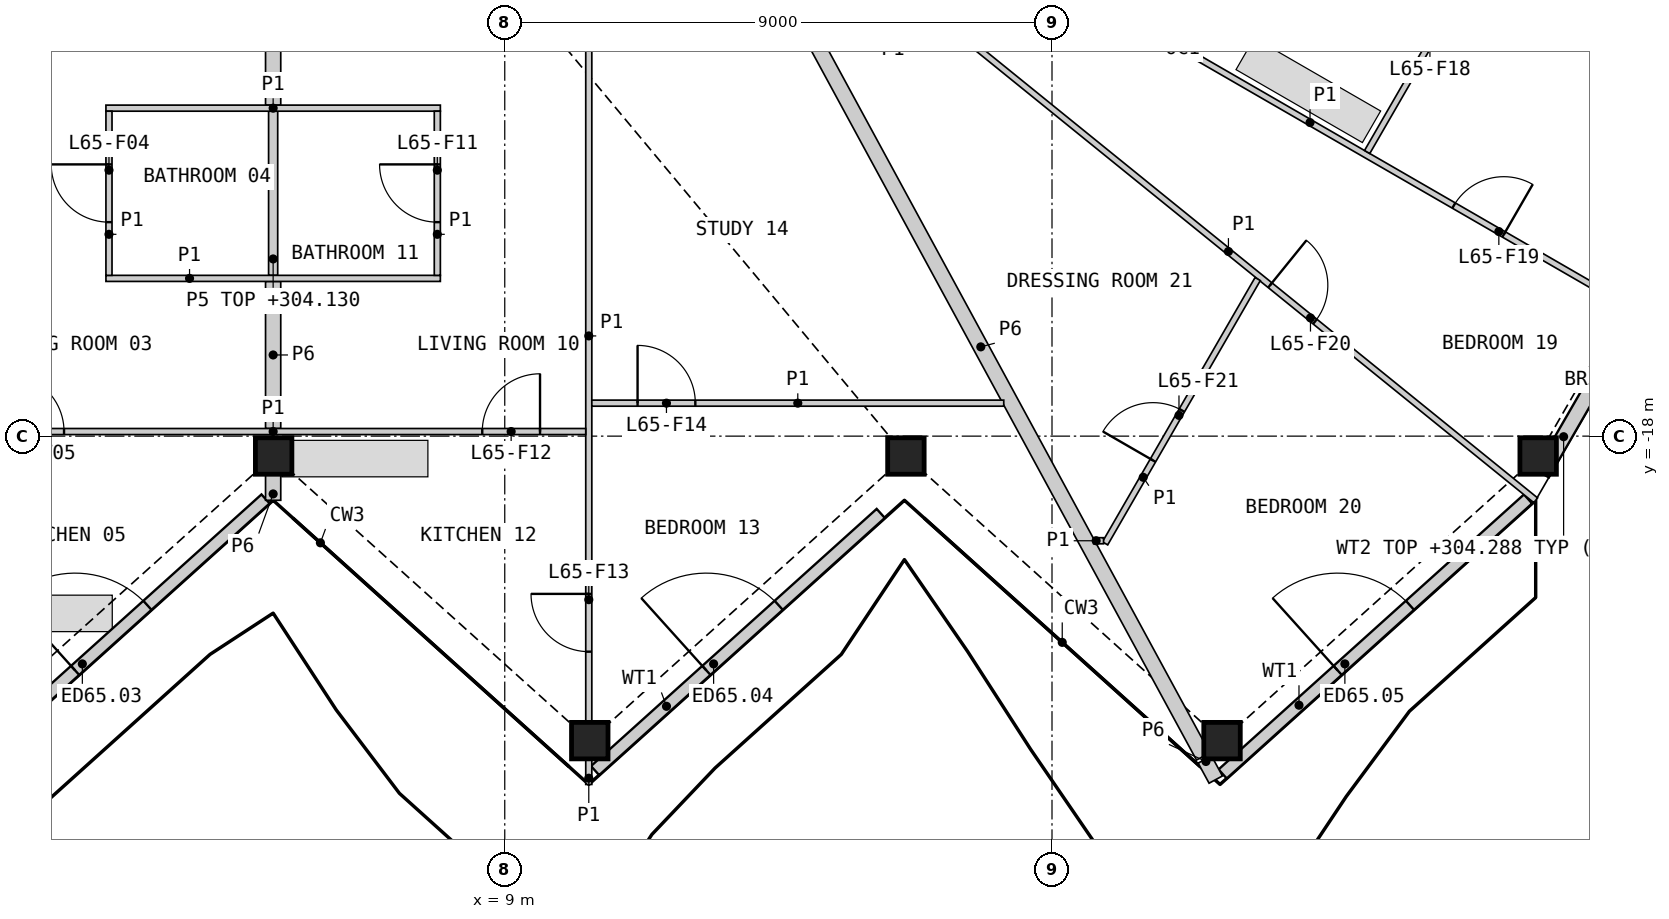
"""IFC4 building model, lengths in metres.
Left out: names, types, materials, properties, quantities, classifications, styles, units other than length and angle.
Written with IfcOpenShell. Run it as: python <this file> out.ifc"""

import sys

from ifc_helpers import new_model, si_unit, direction, frame, frame_2d, origin, origin_2d, place, context, subcontext, project, spatial, rectangle, hollow_rectangle, extrude, element, fill, save


model = new_model("IFC4")
c1 = context("Model", 3, precision=1e-05, world=origin(), true_north=direction((0.0, 1.0)))
c2 = subcontext(c1, "Body", "Model", "MODEL_VIEW")
j1 = project(units=[si_unit("LENGTHUNIT", "METRE"), si_unit("PLANEANGLEUNIT", "RADIAN")], contexts=[c1])
p1 = place(None, origin())
s1 = spatial("IfcSite", under=j1, at=p1, CompositionType="ELEMENT")
p2 = place(p1, origin())
s2 = spatial("IfcBuilding", under=s1, at=p2, CompositionType="ELEMENT")
p3 = place(p2, frame((0.0, 0.0, 301.8)))
s3 = spatial("IfcBuildingStorey", under=s2, at=p3, CompositionType="ELEMENT", Elevation=301.8)
for number, where, z_axis, x_axis in (
    (1, (5.199, -18.327, 0.0), (0.0, 0.0, 1.0), (1.0, 0.0, 0.0)),
    (2, (10.398, -23.008, 0.0), (0.0, 0.0, 1.0), (1.0, 0.0, 0.0)),
    (3, (15.597, -18.327, 0.0), (0.0, 0.0, 1.0), (1.0, 0.0, 0.0)),
    (4, (20.796, -23.008, 0.0), (0.0, 0.0, 1.0), (1.0, 0.0, 0.0)),
    (5, (25.995, -18.327, 0.0), (0.0, 0.0, 1.0), (1.0, 0.0, 0.0)),
):
    element("IfcColumn", number, at=place(p3, frame(where, z_axis=z_axis, x_axis=x_axis)), inside=s3, PredefinedType="COLUMN", context=c2, shape_type="SweptSolid", body=[
        extrude(hollow_rectangle(XDim=0.6, YDim=0.6, WallThickness=0.04, at=origin_2d()), origin(), (0.0, 0.0, 1.0), 3.4),
    ])
p4 = place(p3, frame((0.104, -23.501, 0.0), z_axis=(0.0, 0.0, 1.0), x_axis=(0.743137782456, 0.669138428344, 0.0)))
e6 = element("IfcWall", 6, at=p4, inside=s3, PredefinedType="SOLIDWALL", context=c2, shape_type="SweptSolid", body=[
    extrude(rectangle(XDim=6.678, YDim=0.2, at=frame_2d((3.339, 0.0))), origin(), (0.0, 0.0, 1.0), 2.488),
])
p5 = place(p4, frame((2.463, 0.0, 0.0)))
e7 = element("IfcOpeningElement", 7, at=p5, cuts=e6, PredefinedType="OPENING", context=c2, shape_type="SweptSolid", body=[
    extrude(rectangle(XDim=1.6, YDim=2.25, at=frame_2d((0.8, 1.125))), frame((0.0, 0.11, 0.0), z_axis=(0.0, -1.0, 0.0), x_axis=(1.0, 0.0, 0.0)), (0.0, 0.0, 1.0), 0.22),
])
p6 = place(p3, frame((10.485, -23.501, 0.0), z_axis=(0.0, 0.0, 1.0), x_axis=(0.743134744054, 0.669141802745, 0.0)))
e8 = element("IfcWall", 8, at=p6, inside=s3, PredefinedType="SOLIDWALL", context=c2, shape_type="SweptSolid", body=[
    extrude(rectangle(XDim=6.322, YDim=0.2, at=frame_2d((3.161, 0.0))), origin(), (0.0, 0.0, 1.0), 2.488),
])
p7 = place(p6, frame((2.463, 0.0, 0.0)))
e9 = element("IfcOpeningElement", 9, at=p7, cuts=e8, PredefinedType="OPENING", context=c2, shape_type="SweptSolid", body=[
    extrude(rectangle(XDim=1.6, YDim=2.25, at=frame_2d((0.8, 1.125))), frame((0.0, 0.11, 0.0), z_axis=(0.0, -1.0, 0.0), x_axis=(1.0, 0.0, 0.0)), (0.0, 0.0, 1.0), 0.22),
])
p8 = place(p3, frame((20.806, -23.556, 0.0), z_axis=(0.0, 0.0, 1.0), x_axis=(0.743145048269, 0.669130358924, 0.0)))
e10 = element("IfcWall", 10, at=p8, inside=s3, PredefinedType="SOLIDWALL", context=c2, shape_type="SweptSolid", body=[
    extrude(rectangle(XDim=6.759, YDim=0.2, at=frame_2d((3.379, 0.0))), origin(), (0.0, 0.0, 1.0), 2.488),
])
p9 = place(p8, frame((2.545, 0.0, 0.0)))
e11 = element("IfcOpeningElement", 11, at=p9, cuts=e10, PredefinedType="OPENING", context=c2, shape_type="SweptSolid", body=[
    extrude(rectangle(XDim=1.6, YDim=2.25, at=frame_2d((0.8, 1.125))), frame((0.0, 0.11, 0.0), z_axis=(0.0, -1.0, 0.0), x_axis=(1.0, 0.0, 0.0)), (0.0, 0.0, 1.0), 0.22),
])
p10 = place(p3, frame((26.063, -18.617, 0.0), z_axis=(0.0, 0.0, 1.0), x_axis=(0.499968627931, 0.866043515699, 0.0)))
e12 = element("IfcWall", 12, at=p10, inside=s3, PredefinedType="SOLIDWALL", context=c2, shape_type="SweptSolid", body=[
    extrude(rectangle(XDim=2.804, YDim=0.25, at=frame_2d((1.402, 0.0))), origin(), (0.0, 0.0, 1.0), 2.488),
])
p11 = place(p10, frame((1.55, 0.0, 1.6)))
e13 = element("IfcOpeningElement", 13, at=p11, cuts=e12, PredefinedType="OPENING", context=c2, shape_type="SweptSolid", body=[
    extrude(rectangle(XDim=0.9, YDim=0.6, at=frame_2d((0.45, 0.3))), frame((0.0, 0.135, 0.0), z_axis=(0.0, -1.0, 0.0), x_axis=(1.0, 0.0, 0.0)), (0.0, 0.0, 1.0), 0.27),
])
p12 = place(p3, frame((13.171, -9.796, 0.0), z_axis=(0.0, 0.0, 1.0), x_axis=(0.477178668135, -0.878806303275, 0.0)))
e14 = element("IfcWall", 14, at=p12, inside=s3, PredefinedType="PARTITIONING", context=c2, shape_type="SweptSolid", body=[
    extrude(rectangle(XDim=15.33, YDim=0.25, at=frame_2d((7.665, 0.0))), origin(), (0.0, 0.0, 1.0), 2.33),
])
p13 = place(p3, frame((5.191, -12.556, 0.0), z_axis=(0.0, 0.0, 1.0), x_axis=(0.0, 1.0, 0.0)))
e15 = element("IfcWall", 15, at=p13, inside=s3, PredefinedType="PARTITIONING", context=c2, shape_type="SweptSolid", body=[
    extrude(rectangle(XDim=2.55, YDim=0.25, at=frame_2d((1.275, 0.0))), origin(), (0.0, 0.0, 1.0), 2.33),
])
p14 = place(p3, frame((5.191, -17.875, 0.0), z_axis=(0.0, 0.0, 1.0), x_axis=(0.0, 1.0, 0.0)))
e16 = element("IfcWall", 16, at=p14, inside=s3, PredefinedType="PARTITIONING", context=c2, shape_type="SweptSolid", body=[
    extrude(rectangle(XDim=2.419, YDim=0.25, at=frame_2d((1.209, 0.0))), origin(), (0.0, 0.0, 1.0), 2.33),
])
p15 = place(p3, frame((5.191, -19.055, 0.0), z_axis=(0.0, 0.0, 1.0), x_axis=(0.0, 1.0, 0.0)))
e17 = element("IfcWall", 17, at=p15, inside=s3, PredefinedType="PARTITIONING", context=c2, shape_type="SweptSolid", body=[
    extrude(rectangle(XDim=0.418, YDim=0.25, at=frame_2d((0.209, 0.0))), origin(), (0.0, 0.0, 1.0), 2.33),
])
p16 = place(p3, frame((20.514, -23.318, 0.0), z_axis=(0.0, 0.0, 1.0), x_axis=(0.477077538769, -0.878861207474, 0.0)))
e18 = element("IfcWall", 18, at=p16, inside=s3, PredefinedType="PARTITIONING", context=c2, shape_type="SweptSolid", body=[
    extrude(rectangle(XDim=0.376, YDim=0.25, at=frame_2d((0.188, 0.0))), origin(), (0.0, 0.0, 1.0), 2.33),
])
p17 = place(p3, frame((5.191, -15.356, 0.0), z_axis=(0.0, 0.0, 1.0), x_axis=(0.0, 1.0, 0.0)))
e19 = element("IfcWall", 19, at=p17, inside=s3, PredefinedType="PLUMBINGWALL", context=c2, shape_type="SweptSolid", body=[
    extrude(rectangle(XDim=2.7, YDim=0.15, at=frame_2d((1.35, 0.0))), origin(), (0.0, 0.0, 1.0), 2.33),
])
p18 = place(p3, frame((15.848, -10.871, 0.0), z_axis=(0.0, 0.0, 1.0), x_axis=(0.77713687197, -0.629331615465, 0.0)))
e20 = element("IfcWall", 20, at=p18, inside=s3, PredefinedType="PARTITIONING", context=c2, shape_type="SweptSolid", body=[
    extrude(rectangle(XDim=13.004, YDim=0.1, at=frame_2d((6.502, 0.0))), origin(), (0.0, 0.0, 1.0), 2.33),
])
p19 = place(p18, frame((7.384, 0.0, 0.0)))
e21 = element("IfcOpeningElement", 21, at=p19, cuts=e20, PredefinedType="OPENING", context=c2, shape_type="SweptSolid", body=[
    extrude(rectangle(XDim=0.95, YDim=2.1, at=frame_2d((0.475, 1.05))), frame((0.0, 0.06, 0.0), z_axis=(0.0, -1.0, 0.0), x_axis=(1.0, 0.0, 0.0)), (0.0, 0.0, 1.0), 0.12),
])
p20 = place(p3, frame((10.382, -22.698, 0.0), z_axis=(0.0, 0.0, 1.0), x_axis=(0.0, 1.0, 0.0)))
e22 = element("IfcWall", 22, at=p20, inside=s3, PredefinedType="PARTITIONING", context=c2, shape_type="SweptSolid", body=[
    extrude(rectangle(XDim=12.692, YDim=0.1, at=frame_2d((6.346, 0.0))), origin(), (0.0, 0.0, 1.0), 2.33),
])
p21 = place(p20, frame((1.153, 0.0, 0.0)))
e23 = element("IfcOpeningElement", 23, at=p21, cuts=e22, PredefinedType="OPENING", context=c2, shape_type="SweptSolid", body=[
    extrude(rectangle(XDim=0.95, YDim=2.1, at=frame_2d((0.475, 1.05))), frame((0.0, 0.06, 0.0), z_axis=(0.0, -1.0, 0.0), x_axis=(1.0, 0.0, 0.0)), (0.0, 0.0, 1.0), 0.12),
])
p22 = place(p3, frame((17.365, -10.025, 0.0), z_axis=(0.0, 0.0, 1.0), x_axis=(0.866021046153, -0.500007547564, 0.0)))
e24 = element("IfcWall", 24, at=p22, inside=s3, PredefinedType="PARTITIONING", context=c2, shape_type="SweptSolid", body=[
    extrude(rectangle(XDim=11.267, YDim=0.1, at=frame_2d((5.634, 0.0))), origin(), (0.0, 0.0, 1.0), 2.33),
])
p23 = place(p22, frame((8.364, 0.0, 0.0)))
e25 = element("IfcOpeningElement", 25, at=p23, cuts=e24, PredefinedType="OPENING", context=c2, shape_type="SweptSolid", body=[
    extrude(rectangle(XDim=0.95, YDim=2.1, at=frame_2d((0.475, 1.05))), frame((0.0, 0.06, 0.0), z_axis=(0.0, -1.0, 0.0), x_axis=(1.0, 0.0, 0.0)), (0.0, 0.0, 1.0), 0.12),
])
p24 = place(p3, frame((0.05, -17.924, 0.0), z_axis=(0.0, 0.0, 1.0), x_axis=(1.0, 0.0, 0.0)))
e26 = element("IfcWall", 26, at=p24, inside=s3, PredefinedType="PARTITIONING", context=c2, shape_type="SweptSolid", body=[
    extrude(rectangle(XDim=10.282, YDim=0.1, at=frame_2d((5.141, 0.0))), origin(), (0.0, 0.0, 1.0), 2.33),
])
p25 = place(p24, frame((0.752, 0.0, 0.0)))
e27 = element("IfcOpeningElement", 27, at=p25, cuts=e26, PredefinedType="OPENING", context=c2, shape_type="SweptSolid", body=[
    extrude(rectangle(XDim=0.95, YDim=2.1, at=frame_2d((0.475, 1.05))), frame((0.0, 0.06, 0.0), z_axis=(0.0, -1.0, 0.0), x_axis=(1.0, 0.0, 0.0)), (0.0, 0.0, 1.0), 0.12),
])
p26 = place(p24, frame((8.58, 0.0, 0.0)))
e28 = element("IfcOpeningElement", 28, at=p26, cuts=e26, PredefinedType="OPENING", context=c2, shape_type="SweptSolid", body=[
    extrude(rectangle(XDim=0.95, YDim=2.1, at=frame_2d((0.475, 1.05))), frame((0.0, 0.06, 0.0), z_axis=(0.0, -1.0, 0.0), x_axis=(1.0, 0.0, 0.0)), (0.0, 0.0, 1.0), 0.12),
])
p27 = place(p3, frame((23.183, -13.327, 0.0), z_axis=(0.0, 0.0, 1.0), x_axis=(0.499991741039, 0.866030172045, 0.0)))
e29 = element("IfcWall", 29, at=p27, inside=s3, PredefinedType="PARTITIONING", context=c2, shape_type="SweptSolid", body=[
    extrude(rectangle(XDim=7.927, YDim=0.1, at=frame_2d((3.963, 0.0))), origin(), (0.0, 0.0, 1.0), 2.33),
])
p28 = place(p27, frame((1.97, 0.0, 0.0)))
e30 = element("IfcOpeningElement", 30, at=p28, cuts=e29, PredefinedType="OPENING", context=c2, shape_type="SweptSolid", body=[
    extrude(rectangle(XDim=0.95, YDim=2.1, at=frame_2d((0.475, 1.05))), frame((0.0, 0.06, 0.0), z_axis=(0.0, -1.0, 0.0), x_axis=(1.0, 0.0, 0.0)), (0.0, 0.0, 1.0), 0.12),
])
p29 = place(p3, frame((10.432, -17.458, 0.0), z_axis=(0.0, 0.0, 1.0), x_axis=(1.0, 0.0, 0.0)))
e31 = element("IfcWall", 31, at=p29, inside=s3, PredefinedType="PARTITIONING", context=c2, shape_type="SweptSolid", body=[
    extrude(rectangle(XDim=6.775, YDim=0.1, at=frame_2d((3.387, 0.0))), origin(), (0.0, 0.0, 1.0), 2.33),
])
p30 = place(p29, frame((0.752, 0.0, 0.0)))
e32 = element("IfcOpeningElement", 32, at=p30, cuts=e31, PredefinedType="OPENING", context=c2, shape_type="SweptSolid", body=[
    extrude(rectangle(XDim=0.95, YDim=2.1, at=frame_2d((0.475, 1.05))), frame((0.0, 0.06, 0.0), z_axis=(0.0, -1.0, 0.0), x_axis=(1.0, 0.0, 0.0)), (0.0, 0.0, 1.0), 0.12),
])
for number, where, z_axis, x_axis in (
    (33, (2.441, -12.606, 0.0), (0.0, 0.0, 1.0), (1.0, 0.0, 0.0)),
    (34, (2.441, -15.406, 0.0), (0.0, 0.0, 1.0), (1.0, 0.0, 0.0)),
):
    element("IfcWall", number, at=place(p3, frame(where, z_axis=z_axis, x_axis=x_axis)), inside=s3, PredefinedType="PARTITIONING", context=c2, shape_type="SweptSolid", body=[
        extrude(rectangle(XDim=5.5, YDim=0.1, at=frame_2d((2.75, 0.0))), origin(), (0.0, 0.0, 1.0), 2.33),
    ])
p31 = place(p3, frame((18.873, -19.764, 0.0), z_axis=(0.0, 0.0, 1.0), x_axis=(0.499983455602, 0.866034955486, 0.0)))
e35 = element("IfcWall", 35, at=p31, inside=s3, PredefinedType="PARTITIONING", context=c2, shape_type="SweptSolid", body=[
    extrude(rectangle(XDim=5.02, YDim=0.1, at=frame_2d((2.51, 0.0))), origin(), (0.0, 0.0, 1.0), 2.33),
])
p32 = place(p31, frame((1.576, 0.0, 0.0)))
e36 = element("IfcOpeningElement", 36, at=p32, cuts=e35, PredefinedType="OPENING", context=c2, shape_type="SweptSolid", body=[
    extrude(rectangle(XDim=0.95, YDim=2.1, at=frame_2d((0.475, 1.05))), frame((0.0, 0.06, 0.0), z_axis=(0.0, -1.0, 0.0), x_axis=(1.0, 0.0, 0.0)), (0.0, 0.0, 1.0), 0.12),
])
p33 = place(p3, frame((2.491, -15.356, 0.0), z_axis=(0.0, 0.0, 1.0), x_axis=(0.0, 1.0, 0.0)))
e37 = element("IfcWall", 37, at=p33, inside=s3, PredefinedType="PARTITIONING", context=c2, shape_type="SweptSolid", body=[
    extrude(rectangle(XDim=2.7, YDim=0.1, at=frame_2d((1.35, 0.0))), origin(), (0.0, 0.0, 1.0), 2.33),
])
p34 = place(p33, frame((0.875, 0.0, 0.0)))
e38 = element("IfcOpeningElement", 38, at=p34, cuts=e37, PredefinedType="OPENING", context=c2, shape_type="SweptSolid", body=[
    extrude(rectangle(XDim=0.95, YDim=2.1, at=frame_2d((0.475, 1.05))), frame((0.0, 0.06, 0.0), z_axis=(0.0, -1.0, 0.0), x_axis=(1.0, 0.0, 0.0)), (0.0, 0.0, 1.0), 0.12),
])
p35 = place(p3, frame((7.891, -15.356, 0.0), z_axis=(0.0, 0.0, 1.0), x_axis=(0.0, 1.0, 0.0)))
e39 = element("IfcWall", 39, at=p35, inside=s3, PredefinedType="PARTITIONING", context=c2, shape_type="SweptSolid", body=[
    extrude(rectangle(XDim=2.7, YDim=0.1, at=frame_2d((1.35, 0.0))), origin(), (0.0, 0.0, 1.0), 2.33),
])
p36 = place(p35, frame((0.875, 0.0, 0.0)))
e40 = element("IfcOpeningElement", 40, at=p36, cuts=e39, PredefinedType="OPENING", context=c2, shape_type="SweptSolid", body=[
    extrude(rectangle(XDim=0.95, YDim=2.1, at=frame_2d((0.475, 1.05))), frame((0.0, 0.06, 0.0), z_axis=(0.0, -1.0, 0.0), x_axis=(1.0, 0.0, 0.0)), (0.0, 0.0, 1.0), 0.12),
])
p37 = place(p3, frame((10.382, -23.729, 0.0), z_axis=(0.0, 0.0, 1.0), x_axis=(0.0, 1.0, 0.0)))
e41 = element("IfcWall", 41, at=p37, inside=s3, PredefinedType="PARTITIONING", context=c2, shape_type="SweptSolid", body=[
    extrude(rectangle(XDim=0.411, YDim=0.1, at=frame_2d((0.206, 0.0))), origin(), (0.0, 0.0, 1.0), 2.33),
])
p38 = place(p3, frame((18.685, -19.721, 0.0), z_axis=(0.0, 0.0, 1.0), x_axis=(1.0, 0.0, 0.0)))
e42 = element("IfcWall", 42, at=p38, inside=s3, PredefinedType="PARTITIONING", context=c2, shape_type="SweptSolid", body=[
    extrude(rectangle(XDim=0.162, YDim=0.1, at=frame_2d((0.081, 0.0))), origin(), (0.0, 0.0, 1.0), 2.33),
])
p39 = place(p5, origin())
e43 = element("IfcDoor", 43, at=p39, inside=s3, OperationType="DOUBLE_DOOR_SINGLE_SWING", PredefinedType="DOOR", context=c2, shape_type="SweptSolid", body=[
    extrude(rectangle(XDim=1.6, YDim=2.25, at=frame_2d((0.8, 1.125))), frame((0.0, 0.025, 0.0), z_axis=(0.0, -1.0, 0.0), x_axis=(1.0, 0.0, 0.0)), (0.0, 0.0, 1.0), 0.05),
])
fill(e7, e43)
p40 = place(p7, origin())
e44 = element("IfcDoor", 44, at=p40, inside=s3, OperationType="DOUBLE_DOOR_SINGLE_SWING", PredefinedType="DOOR", context=c2, shape_type="SweptSolid", body=[
    extrude(rectangle(XDim=1.6, YDim=2.25, at=frame_2d((0.8, 1.125))), frame((0.0, 0.025, 0.0), z_axis=(0.0, -1.0, 0.0), x_axis=(1.0, 0.0, 0.0)), (0.0, 0.0, 1.0), 0.05),
])
fill(e9, e44)
p41 = place(p9, origin())
e45 = element("IfcDoor", 45, at=p41, inside=s3, OperationType="DOUBLE_DOOR_SINGLE_SWING", PredefinedType="DOOR", context=c2, shape_type="SweptSolid", body=[
    extrude(rectangle(XDim=1.6, YDim=2.25, at=frame_2d((0.8, 1.125))), frame((0.0, 0.025, 0.0), z_axis=(0.0, -1.0, 0.0), x_axis=(1.0, 0.0, 0.0)), (0.0, 0.0, 1.0), 0.05),
])
fill(e11, e45)
p42 = place(p11, origin())
e46 = element("IfcWindow", 46, at=p42, inside=s3, PartitioningType="SINGLE_PANEL", PredefinedType="WINDOW", context=c2, shape_type="SweptSolid", body=[
    extrude(rectangle(XDim=0.9, YDim=0.6, at=frame_2d((0.45, 0.3))), frame((0.0, 0.03, 0.0), z_axis=(0.0, -1.0, 0.0), x_axis=(1.0, 0.0, 0.0)), (0.0, 0.0, 1.0), 0.06),
])
fill(e13, e46)
p43 = place(p34, origin())
e47 = element("IfcDoor", 47, at=p43, inside=s3, OperationType="SINGLE_SWING_RIGHT", PredefinedType="DOOR", context=c2, shape_type="SweptSolid", body=[
    extrude(rectangle(XDim=0.95, YDim=2.1, at=frame_2d((0.475, 1.05))), frame((0.0, 0.025, 0.0), z_axis=(0.0, -1.0, 0.0), x_axis=(1.0, 0.0, 0.0)), (0.0, 0.0, 1.0), 0.05),
])
fill(e38, e47)
p44 = place(p25, origin())
e48 = element("IfcDoor", 48, at=p44, inside=s3, OperationType="SINGLE_SWING_LEFT", PredefinedType="DOOR", context=c2, shape_type="SweptSolid", body=[
    extrude(rectangle(XDim=0.95, YDim=2.1, at=frame_2d((0.475, 1.05))), frame((0.0, 0.025, 0.0), z_axis=(0.0, -1.0, 0.0), x_axis=(1.0, 0.0, 0.0)), (0.0, 0.0, 1.0), 0.05),
])
fill(e27, e48)
p45 = place(p36, origin())
e49 = element("IfcDoor", 49, at=p45, inside=s3, OperationType="SINGLE_SWING_RIGHT", PredefinedType="DOOR", context=c2, shape_type="SweptSolid", body=[
    extrude(rectangle(XDim=0.95, YDim=2.1, at=frame_2d((0.475, 1.05))), frame((0.0, 0.025, 0.0), z_axis=(0.0, -1.0, 0.0), x_axis=(1.0, 0.0, 0.0)), (0.0, 0.0, 1.0), 0.05),
])
fill(e40, e49)
p46 = place(p26, origin())
e50 = element("IfcDoor", 50, at=p46, inside=s3, OperationType="SINGLE_SWING_RIGHT", PredefinedType="DOOR", context=c2, shape_type="SweptSolid", body=[
    extrude(rectangle(XDim=0.95, YDim=2.1, at=frame_2d((0.475, 1.05))), frame((0.0, 0.025, 0.0), z_axis=(0.0, -1.0, 0.0), x_axis=(1.0, 0.0, 0.0)), (0.0, 0.0, 1.0), 0.05),
])
fill(e28, e50)
p47 = place(p21, origin())
e51 = element("IfcDoor", 51, at=p47, inside=s3, OperationType="SINGLE_SWING_RIGHT", PredefinedType="DOOR", context=c2, shape_type="SweptSolid", body=[
    extrude(rectangle(XDim=0.95, YDim=2.1, at=frame_2d((0.475, 1.05))), frame((0.0, 0.025, 0.0), z_axis=(0.0, -1.0, 0.0), x_axis=(1.0, 0.0, 0.0)), (0.0, 0.0, 1.0), 0.05),
])
fill(e23, e51)
p48 = place(p30, origin())
e52 = element("IfcDoor", 52, at=p48, inside=s3, OperationType="SINGLE_SWING_LEFT", PredefinedType="DOOR", context=c2, shape_type="SweptSolid", body=[
    extrude(rectangle(XDim=0.95, YDim=2.1, at=frame_2d((0.475, 1.05))), frame((0.0, 0.025, 0.0), z_axis=(0.0, -1.0, 0.0), x_axis=(1.0, 0.0, 0.0)), (0.0, 0.0, 1.0), 0.05),
])
fill(e32, e52)
p49 = place(p23, origin())
e53 = element("IfcDoor", 53, at=p49, inside=s3, OperationType="SINGLE_SWING_RIGHT", PredefinedType="DOOR", context=c2, shape_type="SweptSolid", body=[
    extrude(rectangle(XDim=0.95, YDim=2.1, at=frame_2d((0.475, 1.05))), frame((0.0, 0.025, 0.0), z_axis=(0.0, -1.0, 0.0), x_axis=(1.0, 0.0, 0.0)), (0.0, 0.0, 1.0), 0.05),
])
fill(e25, e53)
p50 = place(p19, origin())
e54 = element("IfcDoor", 54, at=p50, inside=s3, OperationType="SINGLE_SWING_LEFT", PredefinedType="DOOR", context=c2, shape_type="SweptSolid", body=[
    extrude(rectangle(XDim=0.95, YDim=2.1, at=frame_2d((0.475, 1.05))), frame((0.0, 0.025, 0.0), z_axis=(0.0, -1.0, 0.0), x_axis=(1.0, 0.0, 0.0)), (0.0, 0.0, 1.0), 0.05),
])
fill(e21, e54)
p51 = place(p32, origin())
e55 = element("IfcDoor", 55, at=p51, inside=s3, OperationType="SINGLE_SWING_LEFT", PredefinedType="DOOR", context=c2, shape_type="SweptSolid", body=[
    extrude(rectangle(XDim=0.95, YDim=2.1, at=frame_2d((0.475, 1.05))), frame((0.0, 0.025, 0.0), z_axis=(0.0, -1.0, 0.0), x_axis=(1.0, 0.0, 0.0)), (0.0, 0.0, 1.0), 0.05),
])
fill(e36, e55)
save(model, sys.argv[1])
